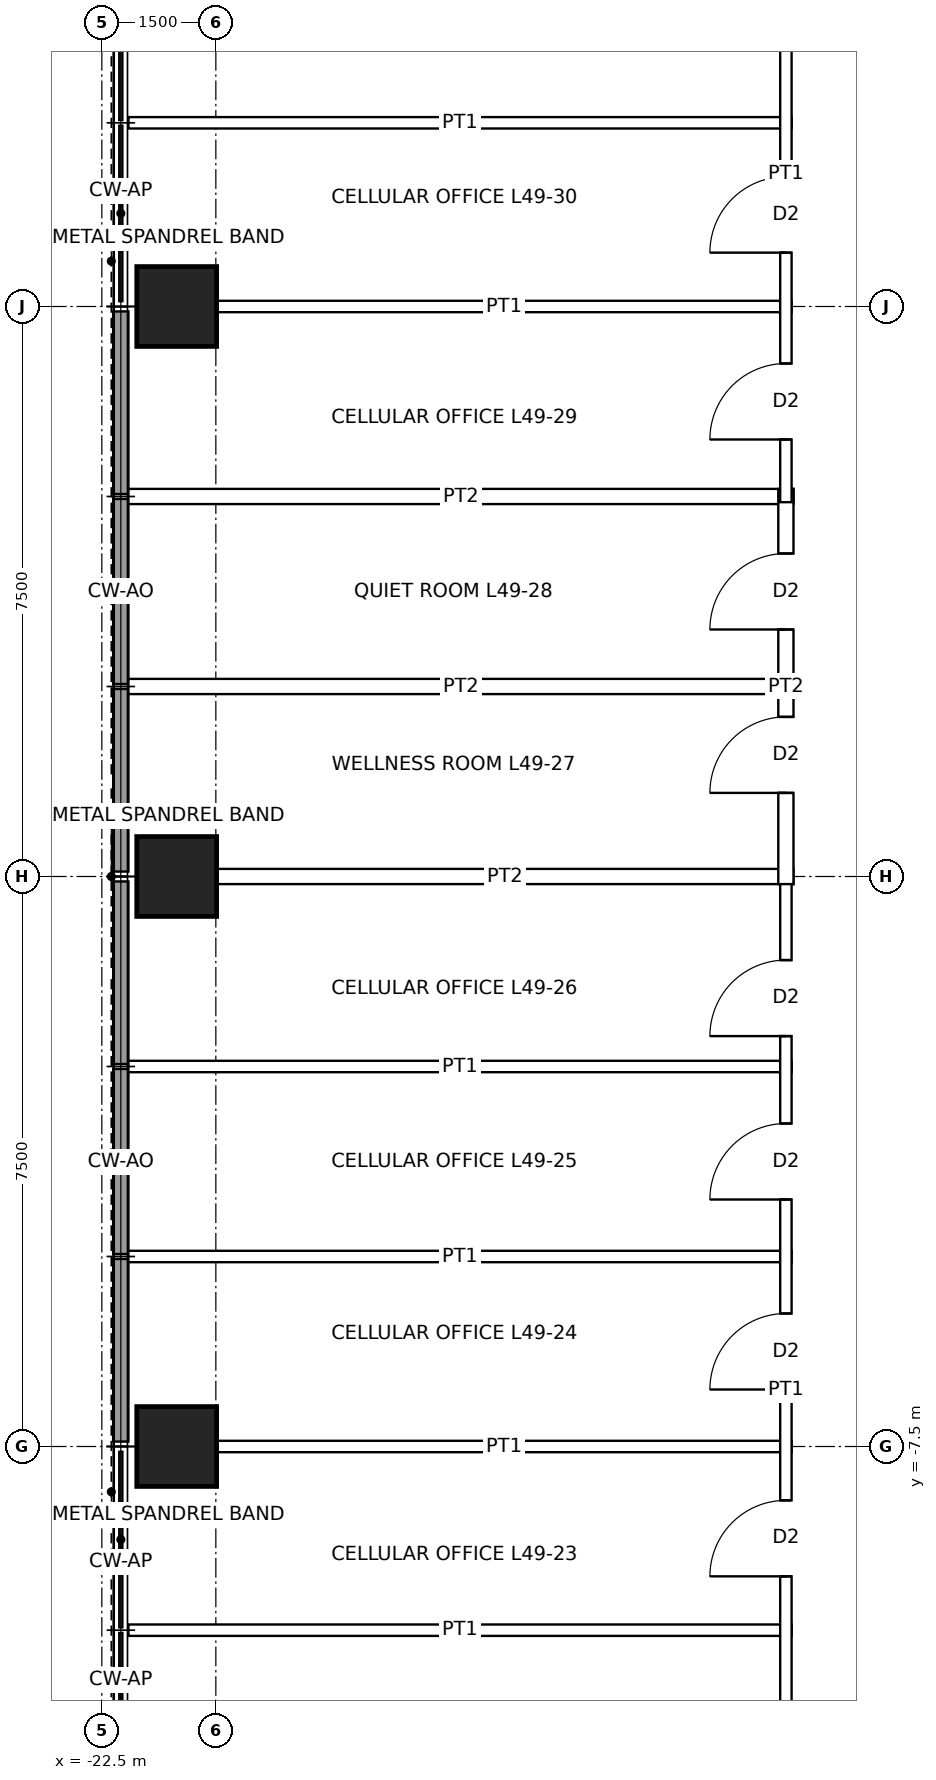
"""IFC4 building model, lengths in metres.
Left out: names, types, materials, properties, quantities, classifications, styles, units other than length and angle.
Written with IfcOpenShell. Run it as: python <this file> out.ifc"""

import sys

from ifc_helpers import new_model, si_unit, direction, frame, frame_2d, origin, origin_2d, place, context, subcontext, project, spatial, rectangle, hollow_rectangle, extrude, element, fill, save


model = new_model("IFC4")
c1 = context("Model", 3, precision=1e-05, world=origin(), true_north=direction((0.0, 1.0)))
c2 = subcontext(c1, "Body", "Model", "MODEL_VIEW")
j1 = project(units=[si_unit("LENGTHUNIT", "METRE"), si_unit("PLANEANGLEUNIT", "RADIAN")], contexts=[c1])
p1 = place(None, origin())
s1 = spatial("IfcSite", under=j1, at=p1, CompositionType="ELEMENT")
p2 = place(p1, origin())
s2 = spatial("IfcBuilding", under=s1, at=p2, CompositionType="ELEMENT")
p3 = place(p2, frame((0.0, 0.0, 229.9)))
s3 = spatial("IfcBuildingStorey", under=s2, at=p3, CompositionType="ELEMENT", Elevation=229.9)
for number, where, z_axis, x_axis in (
    (1, (-21.515, -7.5, 0.0), (0.0, 0.0, 1.0), (1.0, 0.0, 0.0)),
    (2, (-21.515, 0.0, 0.0), (0.0, 0.0, 1.0), (1.0, 0.0, 0.0)),
    (3, (-21.515, 7.5, 0.0), (0.0, 0.0, 1.0), (1.0, 0.0, 0.0)),
):
    element("IfcColumn", number, at=place(p3, frame(where, z_axis=z_axis, x_axis=x_axis)), inside=s3, PredefinedType="COLUMN", context=c2, shape_type="SweptSolid", body=[
        extrude(hollow_rectangle(XDim=1.05, YDim=1.05, WallThickness=0.07, at=origin_2d()), origin(), (0.0, 0.0, 1.0), 4.0),
    ])
p4 = place(p3, frame((-22.25, -7.435, 0.0), z_axis=(0.0, 0.0, 1.0), x_axis=(0.0, 1.0, 0.0)))
e4 = element("IfcWall", 4, at=p4, inside=s3, PredefinedType="SOLIDWALL", context=c2, shape_type="SweptSolid", body=[
    extrude(rectangle(XDim=2.403, YDim=0.2, at=frame_2d((1.201, 0.0))), origin(), (0.0, 0.0, 1.0), 3.85),
])
p5 = place(p3, frame((-22.25, -4.968, 0.0), z_axis=(0.0, 0.0, 1.0), x_axis=(0.0, 1.0, 0.0)))
e5 = element("IfcWall", 5, at=p5, inside=s3, PredefinedType="SOLIDWALL", context=c2, shape_type="SweptSolid", body=[
    extrude(rectangle(XDim=2.435, YDim=0.2, at=frame_2d((1.218, 0.0))), origin(), (0.0, 0.0, 1.0), 3.85),
])
for number, where, z_axis, x_axis in (
    (6, (-22.25, -2.468, 0.0), (0.0, 0.0, 1.0), (0.0, 1.0, 0.0)),
    (7, (-22.25, 0.065, 0.0), (0.0, 0.0, 1.0), (0.0, 1.0, 0.0)),
):
    element("IfcWall", number, at=place(p3, frame(where, z_axis=z_axis, x_axis=x_axis)), inside=s3, PredefinedType="SOLIDWALL", context=c2, shape_type="SweptSolid", body=[
        extrude(rectangle(XDim=2.403, YDim=0.2, at=frame_2d((1.201, 0.0))), origin(), (0.0, 0.0, 1.0), 3.85),
    ])
p6 = place(p3, frame((-22.25, 2.532, 0.0), z_axis=(0.0, 0.0, 1.0), x_axis=(0.0, 1.0, 0.0)))
e8 = element("IfcWall", 8, at=p6, inside=s3, PredefinedType="SOLIDWALL", context=c2, shape_type="SweptSolid", body=[
    extrude(rectangle(XDim=2.435, YDim=0.2, at=frame_2d((1.218, 0.0))), origin(), (0.0, 0.0, 1.0), 3.85),
])
p7 = place(p3, frame((-22.25, 5.032, 0.0), z_axis=(0.0, 0.0, 1.0), x_axis=(0.0, 1.0, 0.0)))
e9 = element("IfcWall", 9, at=p7, inside=s3, PredefinedType="SOLIDWALL", context=c2, shape_type="SweptSolid", body=[
    extrude(rectangle(XDim=2.403, YDim=0.2, at=frame_2d((1.201, 0.0))), origin(), (0.0, 0.0, 1.0), 3.85),
])
p8 = place(p3, frame((-22.15, -9.917, 0.0), z_axis=(0.0, 0.0, 1.0), x_axis=(1.0, 0.0, 0.0)))
e10 = element("IfcWall", 10, at=p8, inside=s3, PredefinedType="PARTITIONING", context=c2, shape_type="SweptSolid", body=[
    extrude(rectangle(XDim=8.725, YDim=0.15, at=frame_2d((4.362, 0.0))), origin(), (0.0, 0.0, 1.0), 3.85),
])
p9 = place(p3, frame((-20.99, -7.5, 0.0), z_axis=(0.0, 0.0, 1.0), x_axis=(1.0, 0.0, 0.0)))
e11 = element("IfcWall", 11, at=p9, inside=s3, PredefinedType="PARTITIONING", context=c2, shape_type="SweptSolid", body=[
    extrude(rectangle(XDim=7.565, YDim=0.15, at=frame_2d((3.782, 0.0))), origin(), (0.0, 0.0, 1.0), 3.238),
])
for number, where, z_axis, x_axis in (
    (12, (-22.15, -5.0, 0.0), (0.0, 0.0, 1.0), (1.0, 0.0, 0.0)),
    (13, (-22.15, -2.5, 0.0), (0.0, 0.0, 1.0), (1.0, 0.0, 0.0)),
):
    element("IfcWall", number, at=place(p3, frame(where, z_axis=z_axis, x_axis=x_axis)), inside=s3, PredefinedType="PARTITIONING", context=c2, shape_type="SweptSolid", body=[
        extrude(rectangle(XDim=8.725, YDim=0.15, at=frame_2d((4.362, 0.0))), origin(), (0.0, 0.0, 1.0), 3.85),
    ])
p10 = place(p3, frame((-20.99, 0.0, 0.0), z_axis=(0.0, 0.0, 1.0), x_axis=(1.0, 0.0, 0.0)))
e14 = element("IfcWall", 14, at=p10, inside=s3, PredefinedType="PARTITIONING", context=c2, shape_type="SweptSolid", body=[
    extrude(rectangle(XDim=7.59, YDim=0.2, at=frame_2d((3.795, 0.0))), origin(), (0.0, 0.0, 1.0), 3.238),
])
for number, where, z_axis, x_axis in (
    (15, (-22.15, 2.5, 0.0), (0.0, 0.0, 1.0), (1.0, 0.0, 0.0)),
    (16, (-22.15, 5.0, 0.0), (0.0, 0.0, 1.0), (1.0, 0.0, 0.0)),
):
    element("IfcWall", number, at=place(p3, frame(where, z_axis=z_axis, x_axis=x_axis)), inside=s3, PredefinedType="PARTITIONING", context=c2, shape_type="SweptSolid", body=[
        extrude(rectangle(XDim=8.75, YDim=0.2, at=frame_2d((4.375, 0.0))), origin(), (0.0, 0.0, 1.0), 3.85),
    ])
p11 = place(p3, frame((-20.99, 7.5, 0.0), z_axis=(0.0, 0.0, 1.0), x_axis=(1.0, 0.0, 0.0)))
e17 = element("IfcWall", 17, at=p11, inside=s3, PredefinedType="PARTITIONING", context=c2, shape_type="SweptSolid", body=[
    extrude(rectangle(XDim=7.565, YDim=0.15, at=frame_2d((3.782, 0.0))), origin(), (0.0, 0.0, 1.0), 3.238),
])
p12 = place(p3, frame((-22.15, 9.917, 0.0), z_axis=(0.0, 0.0, 1.0), x_axis=(1.0, 0.0, 0.0)))
e18 = element("IfcWall", 18, at=p12, inside=s3, PredefinedType="PARTITIONING", context=c2, shape_type="SweptSolid", body=[
    extrude(rectangle(XDim=8.725, YDim=0.15, at=frame_2d((4.362, 0.0))), origin(), (0.0, 0.0, 1.0), 3.85),
])
p13 = place(p3, frame((-13.5, -13.575, 0.0), z_axis=(0.0, 0.0, 1.0), x_axis=(0.0, 1.0, 0.0)))
e19 = element("IfcWall", 19, at=p13, inside=s3, PredefinedType="PARTITIONING", context=c2, shape_type="SweptSolid", body=[
    extrude(rectangle(XDim=13.65, YDim=0.15, at=frame_2d((6.825, 0.0))), origin(), (0.0, 0.0, 1.0), 3.85),
])
p14 = place(p13, frame((4.366, 0.0, 0.0)))
e20 = element("IfcOpeningElement", 20, at=p14, cuts=e19, PredefinedType="OPENING", context=c2, shape_type="SweptSolid", body=[
    extrude(rectangle(XDim=1.0, YDim=2.1, at=frame_2d((0.5, 1.05))), frame((0.0, 0.085, 0.0), z_axis=(0.0, -1.0, 0.0), x_axis=(1.0, 0.0, 0.0)), (0.0, 0.0, 1.0), 0.17),
])
p15 = place(p13, frame((6.825, 0.0, 0.0)))
e21 = element("IfcOpeningElement", 21, at=p15, cuts=e19, PredefinedType="OPENING", context=c2, shape_type="SweptSolid", body=[
    extrude(rectangle(XDim=1.0, YDim=2.1, at=frame_2d((0.5, 1.05))), frame((0.0, 0.085, 0.0), z_axis=(0.0, -1.0, 0.0), x_axis=(1.0, 0.0, 0.0)), (0.0, 0.0, 1.0), 0.17),
])
p16 = place(p13, frame((9.325, 0.0, 0.0)))
e22 = element("IfcOpeningElement", 22, at=p16, cuts=e19, PredefinedType="OPENING", context=c2, shape_type="SweptSolid", body=[
    extrude(rectangle(XDim=1.0, YDim=2.1, at=frame_2d((0.5, 1.05))), frame((0.0, 0.085, 0.0), z_axis=(0.0, -1.0, 0.0), x_axis=(1.0, 0.0, 0.0)), (0.0, 0.0, 1.0), 0.17),
])
p17 = place(p13, frame((11.475, 0.0, 0.0)))
e23 = element("IfcOpeningElement", 23, at=p17, cuts=e19, PredefinedType="OPENING", context=c2, shape_type="SweptSolid", body=[
    extrude(rectangle(XDim=1.0, YDim=2.1, at=frame_2d((0.5, 1.05))), frame((0.0, 0.085, 0.0), z_axis=(0.0, -1.0, 0.0), x_axis=(1.0, 0.0, 0.0)), (0.0, 0.0, 1.0), 0.17),
])
p18 = place(p3, frame((-13.5, -0.1, 0.0), z_axis=(0.0, 0.0, 1.0), x_axis=(0.0, 1.0, 0.0)))
e24 = element("IfcWall", 24, at=p18, inside=s3, PredefinedType="PARTITIONING", context=c2, shape_type="SweptSolid", body=[
    extrude(rectangle(XDim=5.2, YDim=0.2, at=frame_2d((2.6, 0.0))), origin(), (0.0, 0.0, 1.0), 3.85),
])
p19 = place(p18, frame((1.2, 0.0, 0.0)))
e25 = element("IfcOpeningElement", 25, at=p19, cuts=e24, PredefinedType="OPENING", context=c2, shape_type="SweptSolid", body=[
    extrude(rectangle(XDim=1.0, YDim=2.1, at=frame_2d((0.5, 1.05))), frame((0.0, 0.11, 0.0), z_axis=(0.0, -1.0, 0.0), x_axis=(1.0, 0.0, 0.0)), (0.0, 0.0, 1.0), 0.22),
])
p20 = place(p18, frame((3.35, 0.0, 0.0)))
e26 = element("IfcOpeningElement", 26, at=p20, cuts=e24, PredefinedType="OPENING", context=c2, shape_type="SweptSolid", body=[
    extrude(rectangle(XDim=1.0, YDim=2.1, at=frame_2d((0.5, 1.05))), frame((0.0, 0.11, 0.0), z_axis=(0.0, -1.0, 0.0), x_axis=(1.0, 0.0, 0.0)), (0.0, 0.0, 1.0), 0.22),
])
p21 = place(p3, frame((-13.5, 4.925, 0.0), z_axis=(0.0, 0.0, 1.0), x_axis=(0.0, 1.0, 0.0)))
e27 = element("IfcWall", 27, at=p21, inside=s3, PredefinedType="PARTITIONING", context=c2, shape_type="SweptSolid", body=[
    extrude(rectangle(XDim=8.65, YDim=0.15, at=frame_2d((4.325, 0.0))), origin(), (0.0, 0.0, 1.0), 3.85),
])
p22 = place(p21, frame((0.825, 0.0, 0.0)))
e28 = element("IfcOpeningElement", 28, at=p22, cuts=e27, PredefinedType="OPENING", context=c2, shape_type="SweptSolid", body=[
    extrude(rectangle(XDim=1.0, YDim=2.1, at=frame_2d((0.5, 1.05))), frame((0.0, 0.085, 0.0), z_axis=(0.0, -1.0, 0.0), x_axis=(1.0, 0.0, 0.0)), (0.0, 0.0, 1.0), 0.17),
])
p23 = place(p21, frame((3.283, 0.0, 0.0)))
e29 = element("IfcOpeningElement", 29, at=p23, cuts=e27, PredefinedType="OPENING", context=c2, shape_type="SweptSolid", body=[
    extrude(rectangle(XDim=1.0, YDim=2.1, at=frame_2d((0.5, 1.05))), frame((0.0, 0.085, 0.0), z_axis=(0.0, -1.0, 0.0), x_axis=(1.0, 0.0, 0.0)), (0.0, 0.0, 1.0), 0.17),
])
p24 = place(p14, origin())
e30 = element("IfcDoor", 30, at=p24, inside=s3, OperationType="SINGLE_SWING_LEFT", PredefinedType="DOOR", context=c2, shape_type="SweptSolid", body=[
    extrude(rectangle(XDim=1.0, YDim=2.1, at=frame_2d((0.5, 1.05))), frame((0.0, 0.025, 0.0), z_axis=(0.0, -1.0, 0.0), x_axis=(1.0, 0.0, 0.0)), (0.0, 0.0, 1.0), 0.05),
])
fill(e20, e30)
p25 = place(p15, origin())
e31 = element("IfcDoor", 31, at=p25, inside=s3, OperationType="SINGLE_SWING_LEFT", PredefinedType="DOOR", context=c2, shape_type="SweptSolid", body=[
    extrude(rectangle(XDim=1.0, YDim=2.1, at=frame_2d((0.5, 1.05))), frame((0.0, 0.025, 0.0), z_axis=(0.0, -1.0, 0.0), x_axis=(1.0, 0.0, 0.0)), (0.0, 0.0, 1.0), 0.05),
])
fill(e21, e31)
p26 = place(p16, origin())
e32 = element("IfcDoor", 32, at=p26, inside=s3, OperationType="SINGLE_SWING_LEFT", PredefinedType="DOOR", context=c2, shape_type="SweptSolid", body=[
    extrude(rectangle(XDim=1.0, YDim=2.1, at=frame_2d((0.5, 1.05))), frame((0.0, 0.025, 0.0), z_axis=(0.0, -1.0, 0.0), x_axis=(1.0, 0.0, 0.0)), (0.0, 0.0, 1.0), 0.05),
])
fill(e22, e32)
p27 = place(p17, origin())
e33 = element("IfcDoor", 33, at=p27, inside=s3, OperationType="SINGLE_SWING_LEFT", PredefinedType="DOOR", context=c2, shape_type="SweptSolid", body=[
    extrude(rectangle(XDim=1.0, YDim=2.1, at=frame_2d((0.5, 1.05))), frame((0.0, 0.025, 0.0), z_axis=(0.0, -1.0, 0.0), x_axis=(1.0, 0.0, 0.0)), (0.0, 0.0, 1.0), 0.05),
])
fill(e23, e33)
p28 = place(p19, origin())
e34 = element("IfcDoor", 34, at=p28, inside=s3, OperationType="SINGLE_SWING_LEFT", PredefinedType="DOOR", context=c2, shape_type="SweptSolid", body=[
    extrude(rectangle(XDim=1.0, YDim=2.1, at=frame_2d((0.5, 1.05))), frame((0.0, 0.025, 0.0), z_axis=(0.0, -1.0, 0.0), x_axis=(1.0, 0.0, 0.0)), (0.0, 0.0, 1.0), 0.05),
])
fill(e25, e34)
p29 = place(p20, origin())
e35 = element("IfcDoor", 35, at=p29, inside=s3, OperationType="SINGLE_SWING_LEFT", PredefinedType="DOOR", context=c2, shape_type="SweptSolid", body=[
    extrude(rectangle(XDim=1.0, YDim=2.1, at=frame_2d((0.5, 1.05))), frame((0.0, 0.025, 0.0), z_axis=(0.0, -1.0, 0.0), x_axis=(1.0, 0.0, 0.0)), (0.0, 0.0, 1.0), 0.05),
])
fill(e26, e35)
p30 = place(p22, origin())
e36 = element("IfcDoor", 36, at=p30, inside=s3, OperationType="SINGLE_SWING_LEFT", PredefinedType="DOOR", context=c2, shape_type="SweptSolid", body=[
    extrude(rectangle(XDim=1.0, YDim=2.1, at=frame_2d((0.5, 1.05))), frame((0.0, 0.025, 0.0), z_axis=(0.0, -1.0, 0.0), x_axis=(1.0, 0.0, 0.0)), (0.0, 0.0, 1.0), 0.05),
])
fill(e28, e36)
p31 = place(p23, origin())
e37 = element("IfcDoor", 37, at=p31, inside=s3, OperationType="SINGLE_SWING_LEFT", PredefinedType="DOOR", context=c2, shape_type="SweptSolid", body=[
    extrude(rectangle(XDim=1.0, YDim=2.1, at=frame_2d((0.5, 1.05))), frame((0.0, 0.025, 0.0), z_axis=(0.0, -1.0, 0.0), x_axis=(1.0, 0.0, 0.0)), (0.0, 0.0, 1.0), 0.05),
])
fill(e29, e37)
save(model, sys.argv[1])
